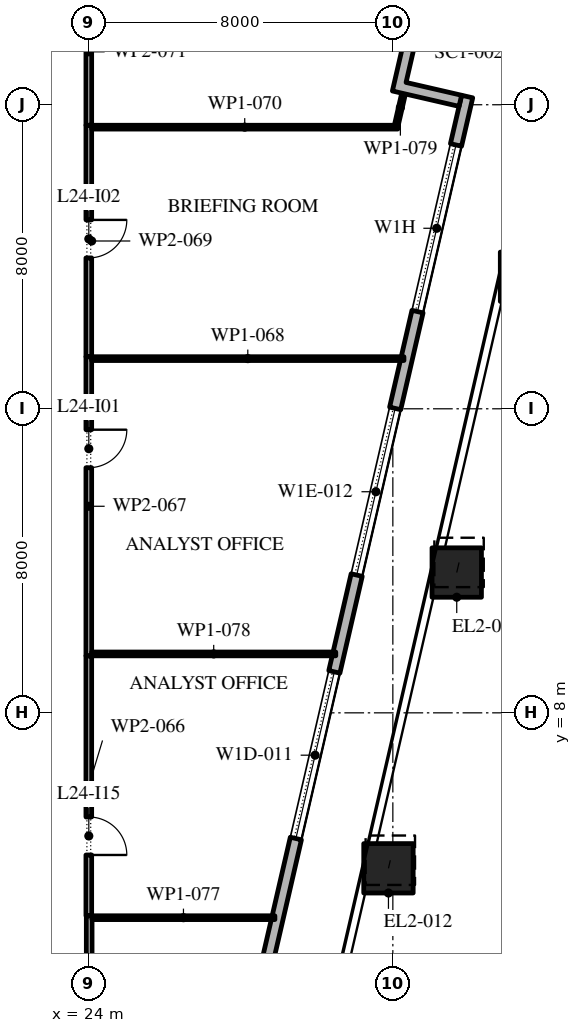
"""IFC4 building model, lengths in metres.
Left out: names, types, materials, properties, quantities, classifications, styles, units other than length and angle.
Written with IfcOpenShell. Run it as: python <this file> out.ifc"""

import sys

from ifc_helpers import new_model, si_unit, direction, frame, frame_2d, origin, origin_2d, place, context, subcontext, project, spatial, polyline, rectangle, outline, extrude, element, fill, save


model = new_model("IFC4")
c1 = context("Model", 3, precision=1e-05, world=origin(), true_north=direction((0.0, 1.0)))
c2 = subcontext(c1, "Body", "Model", "MODEL_VIEW")
j1 = project(units=[si_unit("LENGTHUNIT", "METRE"), si_unit("PLANEANGLEUNIT", "RADIAN")], contexts=[c1])
p1 = place(None, origin())
s1 = spatial("IfcSite", under=j1, at=p1, CompositionType="ELEMENT")
p2 = place(p1, origin())
s2 = spatial("IfcBuilding", under=s1, at=p2, CompositionType="ELEMENT")
p3 = place(p2, frame((0.0, 0.0, 114.0)))
s3 = spatial("IfcBuildingStorey", under=s2, at=p3, CompositionType="ELEMENT", Elevation=114.0)
p4 = place(p3, frame((31.885, 3.909, 0.0), z_axis=(0.011668267153, 0.050562490995, 0.998652735462), x_axis=(-0.974391195695, 0.224859506699, 0.0)))
e1 = element("IfcColumn", 1, at=p4, inside=s3, PredefinedType="COLUMN", context=c2, shape_type="SweptSolid", body=[
    extrude(rectangle(XDim=1.3, YDim=1.3, at=origin_2d()), origin(), (0.0, 0.0, 1.0), 4.206),
])
p5 = place(p3, frame((33.681, 11.691, 0.0), z_axis=(0.014559788571, 0.063169759976, 0.997896584813), x_axis=(-0.97445148511, 0.224598092528, 0.0)))
e2 = element("IfcColumn", 2, at=p5, inside=s3, PredefinedType="COLUMN", context=c2, shape_type="SweptSolid", body=[
    extrude(rectangle(XDim=1.3, YDim=1.3, at=origin_2d()), origin(), (0.0, 0.0, 1.0), 4.209),
])
p6 = place(p3, frame((35.478, 19.474, 0.0), z_axis=(0.017502025619, 0.075687567741, 0.996977969259), x_axis=(-0.974290512438, 0.225295355862, 0.0)))
e3 = element("IfcColumn", 3, at=p6, inside=s3, PredefinedType="COLUMN", context=c2, shape_type="SweptSolid", body=[
    extrude(rectangle(XDim=1.3, YDim=1.3, at=origin_2d()), origin(), (0.0, 0.0, 1.0), 4.213),
])
p7 = place(p3, frame((22.82, -24.016, 0.0), z_axis=(0.0, 0.0, 1.0), x_axis=(0.224953880882, 0.974369412223, 0.0)))
e4 = element("IfcWall", 4, at=p7, inside=s3, PredefinedType="STANDARD", context=c2, shape_type="SweptSolid", body=[
    extrude(rectangle(XDim=49.5, YDim=0.3, at=frame_2d((24.75, 0.0))), origin(), (0.0, 0.0, 1.0), 4.0),
])
p8 = place(p7, frame((1.157, 0.0, 0.45)))
e5 = element("IfcOpeningElement", 5, at=p8, cuts=e4, PredefinedType="OPENING", context=c2, shape_type="SweptSolid", body=[
    extrude(rectangle(XDim=4.5, YDim=3.05, at=frame_2d((2.25, 1.525))), frame((0.0, 0.16, 0.0), z_axis=(0.0, -1.0, 0.0), x_axis=(1.0, 0.0, 0.0)), (0.0, 0.0, 1.0), 0.32),
])
p9 = place(p7, frame((8.121, 0.0, 0.45)))
e6 = element("IfcOpeningElement", 6, at=p9, cuts=e4, PredefinedType="OPENING", context=c2, shape_type="SweptSolid", body=[
    extrude(rectangle(XDim=4.5, YDim=3.05, at=frame_2d((2.25, 1.525))), frame((0.0, 0.16, 0.0), z_axis=(0.0, -1.0, 0.0), x_axis=(1.0, 0.0, 0.0)), (0.0, 0.0, 1.0), 0.32),
])
p10 = place(p7, frame((15.236, 0.0, 0.45)))
e7 = element("IfcOpeningElement", 7, at=p10, cuts=e4, PredefinedType="OPENING", context=c2, shape_type="SweptSolid", body=[
    extrude(rectangle(XDim=4.5, YDim=3.05, at=frame_2d((2.25, 1.525))), frame((0.0, 0.16, 0.0), z_axis=(0.0, -1.0, 0.0), x_axis=(1.0, 0.0, 0.0)), (0.0, 0.0, 1.0), 0.32),
])
p11 = place(p7, frame((23.4, 0.0, 0.0)))
e8 = element("IfcOpeningElement", 8, at=p11, cuts=e4, PredefinedType="OPENING", context=c2, shape_type="SweptSolid", body=[
    extrude(rectangle(XDim=2.4, YDim=3.5, at=frame_2d((1.2, 1.75))), frame((0.0, 0.16, 0.0), z_axis=(0.0, -1.0, 0.0), x_axis=(1.0, 0.0, 0.0)), (0.0, 0.0, 1.0), 0.32),
])
p12 = place(p7, frame((29.464, 0.0, 0.45)))
e9 = element("IfcOpeningElement", 9, at=p12, cuts=e4, PredefinedType="OPENING", context=c2, shape_type="SweptSolid", body=[
    extrude(rectangle(XDim=4.5, YDim=2.875, at=frame_2d((2.25, 1.438))), frame((0.0, 0.16, 0.0), z_axis=(0.0, -1.0, 0.0), x_axis=(1.0, 0.0, 0.0)), (0.0, 0.0, 1.0), 0.32),
])
p13 = place(p7, frame((36.579, 0.0, 0.45)))
e10 = element("IfcOpeningElement", 10, at=p13, cuts=e4, PredefinedType="OPENING", context=c2, shape_type="SweptSolid", body=[
    extrude(rectangle(XDim=4.5, YDim=2.825, at=frame_2d((2.25, 1.413))), frame((0.0, 0.16, 0.0), z_axis=(0.0, -1.0, 0.0), x_axis=(1.0, 0.0, 0.0)), (0.0, 0.0, 1.0), 0.32),
])
p14 = place(p7, frame((43.693, 0.0, 0.45)))
e11 = element("IfcOpeningElement", 11, at=p14, cuts=e4, PredefinedType="OPENING", context=c2, shape_type="SweptSolid", body=[
    extrude(rectangle(XDim=4.5, YDim=2.75, at=frame_2d((2.25, 1.375))), frame((0.0, 0.16, 0.0), z_axis=(0.0, -1.0, 0.0), x_axis=(1.0, 0.0, 0.0)), (0.0, 0.0, 1.0), 0.32),
])
p15 = place(p3, origin())
e12 = element("IfcWall", 12, at=p15, inside=s3, PredefinedType="STANDARD", context=c2, shape_type="SweptSolid", body=[
    extrude(outline(polyline([(32.393, 26.116), (30.639, 26.521), (31.111, 28.567), (31.404, 28.5), (30.999, 26.746), (32.753, 26.341), (32.348, 24.587), (33.809, 24.25), (33.742, 23.957), (31.988, 24.362), (32.393, 26.116)])), origin(), (0.0, 0.0, 1.0), 4.0),
])
p16 = place(p3, frame((24.0, 9.5, 0.0), z_axis=(0.0, 0.0, 1.0), x_axis=(0.0, -1.0, 0.0)))
e13 = element("IfcWall", 13, at=p16, inside=s3, PredefinedType="PARTITIONING", context=c2, shape_type="SweptSolid", body=[
    extrude(rectangle(XDim=6.84, YDim=0.15, at=frame_2d((3.42, 0.0))), origin(), (0.0, 0.0, 1.0), 4.0),
])
p17 = place(p16, frame((4.24, 0.0, 0.0)))
e14 = element("IfcOpeningElement", 14, at=p17, cuts=e13, PredefinedType="OPENING", context=c2, shape_type="SweptSolid", body=[
    extrude(rectangle(XDim=1.0, YDim=2.1, at=frame_2d((0.5, 1.05))), frame((0.0, 0.085, 0.0), z_axis=(0.0, -1.0, 0.0), x_axis=(1.0, 0.0, 0.0)), (0.0, 0.0, 1.0), 0.17),
])
p18 = place(p3, frame((24.0, 17.37, 0.0), z_axis=(0.0, 0.0, 1.0), x_axis=(0.0, -1.0, 0.0)))
e15 = element("IfcWall", 15, at=p18, inside=s3, PredefinedType="PARTITIONING", context=c2, shape_type="SweptSolid", body=[
    extrude(rectangle(XDim=7.87, YDim=0.15, at=frame_2d((3.935, 0.0))), origin(), (0.0, 0.0, 1.0), 4.0),
])
p19 = place(p18, frame((1.92, 0.0, 0.0)))
e16 = element("IfcOpeningElement", 16, at=p19, cuts=e15, PredefinedType="OPENING", context=c2, shape_type="SweptSolid", body=[
    extrude(rectangle(XDim=1.0, YDim=2.1, at=frame_2d((0.5, 1.05))), frame((0.0, 0.085, 0.0), z_axis=(0.0, -1.0, 0.0), x_axis=(1.0, 0.0, 0.0)), (0.0, 0.0, 1.0), 0.17),
])
p20 = place(p3, frame((24.075, 17.32, 0.0), z_axis=(0.0, 0.0, 1.0), x_axis=(1.0, 0.0, 0.0)))
e17 = element("IfcWall", 17, at=p20, inside=s3, PredefinedType="PARTITIONING", context=c2, shape_type="SweptSolid", body=[
    extrude(rectangle(XDim=8.217, YDim=0.1, at=frame_2d((4.108, 0.0))), origin(), (0.0, 0.0, 1.0), 4.0),
])
p21 = place(p3, frame((24.0, 23.46, 0.0), z_axis=(0.0, 0.0, 1.0), x_axis=(0.0, -1.0, 0.0)))
e18 = element("IfcWall", 18, at=p21, inside=s3, PredefinedType="PARTITIONING", context=c2, shape_type="SweptSolid", body=[
    extrude(rectangle(XDim=6.09, YDim=0.15, at=frame_2d((3.045, 0.0))), origin(), (0.0, 0.0, 1.0), 4.0),
])
p22 = place(p21, frame((2.49, 0.0, 0.0)))
e19 = element("IfcOpeningElement", 19, at=p22, cuts=e18, PredefinedType="OPENING", context=c2, shape_type="SweptSolid", body=[
    extrude(rectangle(XDim=1.0, YDim=2.1, at=frame_2d((0.5, 1.05))), frame((0.0, 0.085, 0.0), z_axis=(0.0, -1.0, 0.0), x_axis=(1.0, 0.0, 0.0)), (0.0, 0.0, 1.0), 0.17),
])
p23 = place(p3, frame((24.075, 23.41, 0.0), z_axis=(0.0, 0.0, 1.0), x_axis=(1.0, 0.0, 0.0)))
e20 = element("IfcWall", 20, at=p23, inside=s3, PredefinedType="PARTITIONING", context=c2, shape_type="SweptSolid", body=[
    extrude(rectangle(XDim=8.055, YDim=0.1, at=frame_2d((4.027, 0.0))), origin(), (0.0, 0.0, 1.0), 4.0),
])
p24 = place(p3, frame((24.0, 27.325, 0.0), z_axis=(0.0, 0.0, 1.0), x_axis=(0.0, -1.0, 0.0)))
e21 = element("IfcWall", 21, at=p24, inside=s3, PredefinedType="PARTITIONING", context=c2, shape_type="SweptSolid", body=[
    extrude(rectangle(XDim=3.865, YDim=0.15, at=frame_2d((1.933, 0.0))), origin(), (0.0, 0.0, 1.0), 4.0),
])
p25 = place(p3, frame((24.01, 2.66, 0.0), z_axis=(0.0, 0.0, 1.0), x_axis=(0.0, -1.0, 0.0)))
e22 = element("IfcWall", 22, at=p25, inside=s3, PredefinedType="PARTITIONING", context=c2, shape_type="SweptSolid", body=[
    extrude(rectangle(XDim=10.275, YDim=0.15, at=frame_2d((5.137, 0.0))), origin(), (0.0, 0.0, 1.0), 4.0),
])
p26 = place(p25, frame((2.7, 0.0, 0.0)))
e23 = element("IfcOpeningElement", 23, at=p26, cuts=e22, PredefinedType="OPENING", context=c2, shape_type="SweptSolid", body=[
    extrude(rectangle(XDim=1.0, YDim=2.1, at=frame_2d((0.5, 1.05))), frame((0.0, 0.085, 0.0), z_axis=(0.0, -1.0, 0.0), x_axis=(1.0, 0.0, 0.0)), (0.0, 0.0, 1.0), 0.17),
])
p27 = place(p3, frame((28.896, 2.61, 0.0), z_axis=(0.0, 0.0, 1.0), x_axis=(-1.0, 0.0, 0.0)))
e24 = element("IfcWall", 24, at=p27, inside=s3, PredefinedType="PARTITIONING", context=c2, shape_type="SweptSolid", body=[
    extrude(rectangle(XDim=4.811, YDim=0.1, at=frame_2d((2.406, 0.0))), origin(), (0.0, 0.0, 1.0), 4.0),
])
p28 = place(p3, frame((30.498, 9.55, 0.0), z_axis=(0.0, 0.0, 1.0), x_axis=(-1.0, 0.0, 0.0)))
e25 = element("IfcWall", 25, at=p28, inside=s3, PredefinedType="PARTITIONING", context=c2, shape_type="SweptSolid", body=[
    extrude(rectangle(XDim=6.423, YDim=0.1, at=frame_2d((3.211, 0.0))), origin(), (0.0, 0.0, 1.0), 4.0),
])
p29 = place(p3, frame((32.091, 23.459, 0.0), z_axis=(0.0, 0.0, 1.0), x_axis=(0.223406444343, 0.97472537703, 0.0)))
e26 = element("IfcWall", 26, at=p29, inside=s3, PredefinedType="PARTITIONING", context=c2, shape_type="SweptSolid", body=[
    extrude(rectangle(XDim=0.957, YDim=0.1, at=frame_2d((0.479, 0.0))), origin(), (0.0, 0.0, 1.0), 4.0),
])
p30 = place(p12, origin())
e27 = element("IfcWindow", 27, at=p30, inside=s3, PartitioningType="DOUBLE_PANEL_VERTICAL", PredefinedType="WINDOW", context=c2, shape_type="SweptSolid", body=[
    extrude(rectangle(XDim=4.5, YDim=2.875, at=frame_2d((2.25, 1.438))), frame((0.0, 0.03, 0.0), z_axis=(0.0, -1.0, 0.0), x_axis=(1.0, 0.0, 0.0)), (0.0, 0.0, 1.0), 0.06),
])
fill(e9, e27)
p31 = place(p13, origin())
e28 = element("IfcWindow", 28, at=p31, inside=s3, PartitioningType="DOUBLE_PANEL_VERTICAL", PredefinedType="WINDOW", context=c2, shape_type="SweptSolid", body=[
    extrude(rectangle(XDim=4.5, YDim=2.825, at=frame_2d((2.25, 1.413))), frame((0.0, 0.03, 0.0), z_axis=(0.0, -1.0, 0.0), x_axis=(1.0, 0.0, 0.0)), (0.0, 0.0, 1.0), 0.06),
])
fill(e10, e28)
p32 = place(p14, origin())
e29 = element("IfcWindow", 29, at=p32, inside=s3, PartitioningType="DOUBLE_PANEL_VERTICAL", PredefinedType="WINDOW", context=c2, shape_type="SweptSolid", body=[
    extrude(rectangle(XDim=4.5, YDim=2.75, at=frame_2d((2.25, 1.375))), frame((0.0, 0.03, 0.0), z_axis=(0.0, -1.0, 0.0), x_axis=(1.0, 0.0, 0.0)), (0.0, 0.0, 1.0), 0.06),
])
fill(e11, e29)
p33 = place(p19, origin())
e30 = element("IfcDoor", 30, at=p33, inside=s3, OperationType="SINGLE_SWING_RIGHT", PredefinedType="DOOR", context=c2, shape_type="SweptSolid", body=[
    extrude(rectangle(XDim=1.0, YDim=2.1, at=frame_2d((0.5, 1.05))), frame((0.0, 0.025, 0.0), z_axis=(0.0, -1.0, 0.0), x_axis=(1.0, 0.0, 0.0)), (0.0, 0.0, 1.0), 0.05),
])
fill(e16, e30)
p34 = place(p22, origin())
e31 = element("IfcDoor", 31, at=p34, inside=s3, OperationType="SINGLE_SWING_RIGHT", PredefinedType="DOOR", context=c2, shape_type="SweptSolid", body=[
    extrude(rectangle(XDim=1.0, YDim=2.1, at=frame_2d((0.5, 1.05))), frame((0.0, 0.025, 0.0), z_axis=(0.0, -1.0, 0.0), x_axis=(1.0, 0.0, 0.0)), (0.0, 0.0, 1.0), 0.05),
])
fill(e19, e31)
p35 = place(p17, origin())
e32 = element("IfcDoor", 32, at=p35, inside=s3, OperationType="SINGLE_SWING_LEFT", PredefinedType="DOOR", context=c2, shape_type="SweptSolid", body=[
    extrude(rectangle(XDim=1.0, YDim=2.1, at=frame_2d((0.5, 1.05))), frame((0.0, 0.025, 0.0), z_axis=(0.0, -1.0, 0.0), x_axis=(1.0, 0.0, 0.0)), (0.0, 0.0, 1.0), 0.05),
])
fill(e14, e32)
save(model, sys.argv[1])
